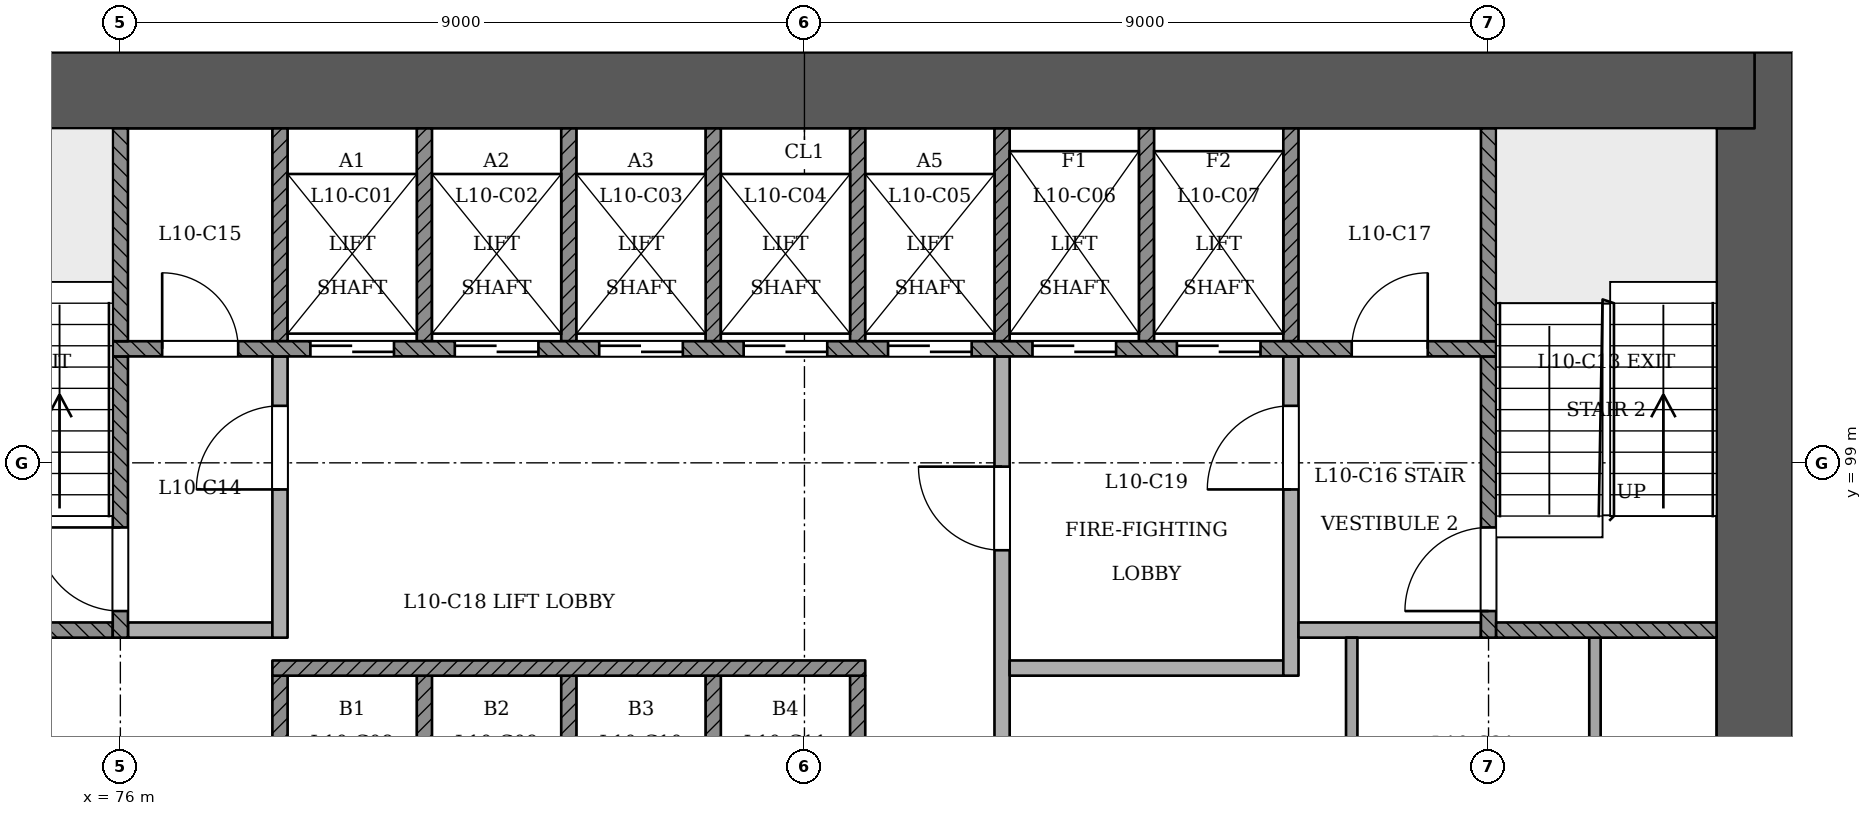
"""IFC4 building model, lengths in metres.
Left out: names, types, materials, properties, quantities, classifications, styles, units other than length and angle.
Written with IfcOpenShell. Run it as: python <this file> out.ifc"""

import sys

from ifc_helpers import new_model, si_unit, direction, frame, frame_2d, origin, place, context, subcontext, project, spatial, rectangle, extrude, element, fill, save


model = new_model("IFC4")
c1 = context("Model", 3, precision=1e-05, world=origin(), true_north=direction((0.0, 1.0)))
c2 = subcontext(c1, "Body", "Model", "MODEL_VIEW")
j1 = project(units=[si_unit("LENGTHUNIT", "METRE"), si_unit("PLANEANGLEUNIT", "RADIAN")], contexts=[c1])
p1 = place(None, origin())
s1 = spatial("IfcSite", under=j1, at=p1, CompositionType="ELEMENT")
p2 = place(p1, origin())
s2 = spatial("IfcBuilding", under=s1, at=p2, CompositionType="ELEMENT")
p3 = place(p2, frame((0.0, 0.0, 45.0)))
s3 = spatial("IfcBuildingStorey", under=s2, at=p3, CompositionType="ELEMENT", Elevation=45.0)
p4 = place(p3, frame((97.5, 92.9, 0.0), z_axis=(0.0, 0.0, 1.0), x_axis=(0.0, 1.0, 0.0)))
e1 = element("IfcWall", 1, at=p4, inside=s3, PredefinedType="SHEAR", context=c2, shape_type="SweptSolid", body=[
    extrude(rectangle(XDim=11.5, YDim=1.0, at=frame_2d((5.75, 0.0))), origin(), (0.0, 0.0, 1.0), 3.6),
])
p5 = place(p3, frame((97.5, 103.9, 0.0), z_axis=(0.0, 0.0, 1.0), x_axis=(-1.0, 0.0, 0.0)))
e2 = element("IfcWall", 2, at=p5, inside=s3, PredefinedType="SHEAR", context=c2, shape_type="SweptSolid", body=[
    extrude(rectangle(XDim=25.5, YDim=1.0, at=frame_2d((12.75, 0.0))), origin(), (0.0, 0.0, 1.0), 3.6),
])
p6 = place(p3, frame((61.853, 96.477, 0.0), z_axis=(0.0, 0.0, 1.0), x_axis=(0.500000327816, -0.86602521452, 0.0)))
e3 = element("IfcWall", 3, at=p6, inside=s3, PredefinedType="PARTITIONING", context=c2, shape_type="SweptSolid", body=[
    extrude(rectangle(XDim=39.979, YDim=0.15, at=frame_2d((19.99, 0.0))), origin(), (0.0, 0.0, 1.0), 2.7),
])
p7 = place(p6, frame((1.49, 0.0, 0.0)))
e4 = element("IfcOpeningElement", 4, at=p7, cuts=e3, PredefinedType="OPENING", context=c2, shape_type="SweptSolid", body=[
    extrude(rectangle(XDim=1.0, YDim=2.1, at=frame_2d((0.5, 1.05))), frame((0.0, 0.085, 0.0), z_axis=(0.0, -1.0, 0.0), x_axis=(1.0, 0.0, 0.0)), (0.0, 0.0, 1.0), 0.171),
])
p8 = place(p6, frame((4.55, 0.0, 0.0)))
e5 = element("IfcOpeningElement", 5, at=p8, cuts=e3, PredefinedType="OPENING", context=c2, shape_type="SweptSolid", body=[
    extrude(rectangle(XDim=1.1, YDim=2.1, at=frame_2d((0.55, 1.05))), frame((0.0, 0.085, 0.0), z_axis=(0.0, -1.0, 0.0), x_axis=(1.0, 0.0, 0.0)), (0.0, 0.0, 1.0), 0.171),
])
p9 = place(p6, frame((11.259, 0.0, 0.0)))
e6 = element("IfcOpeningElement", 6, at=p9, cuts=e3, PredefinedType="OPENING", context=c2, shape_type="SweptSolid", body=[
    extrude(rectangle(XDim=1.0, YDim=2.1, at=frame_2d((0.5, 1.05))), frame((0.0, 0.085, 0.0), z_axis=(0.0, -1.0, 0.0), x_axis=(1.0, 0.0, 0.0)), (0.0, 0.0, 1.0), 0.171),
])
p10 = place(p6, frame((17.979, 0.0, 0.0)))
e7 = element("IfcOpeningElement", 7, at=p10, cuts=e3, PredefinedType="OPENING", context=c2, shape_type="SweptSolid", body=[
    extrude(rectangle(XDim=1.2, YDim=2.1, at=frame_2d((0.6, 1.05))), frame((0.0, 0.085, 0.0), z_axis=(0.0, -1.0, 0.0), x_axis=(1.0, 0.0, 0.0)), (0.0, 0.0, 1.0), 0.171),
])
p11 = place(p6, frame((22.699, 0.0, 0.0)))
e8 = element("IfcOpeningElement", 8, at=p11, cuts=e3, PredefinedType="OPENING", context=c2, shape_type="SweptSolid", body=[
    extrude(rectangle(XDim=1.0, YDim=2.1, at=frame_2d((0.5, 1.05))), frame((0.0, 0.085, 0.0), z_axis=(0.0, -1.0, 0.0), x_axis=(1.0, 0.0, 0.0)), (0.0, 0.0, 1.0), 0.171),
])
p12 = place(p6, frame((29.374, 0.0, 0.0)))
e9 = element("IfcOpeningElement", 9, at=p12, cuts=e3, PredefinedType="OPENING", context=c2, shape_type="SweptSolid", body=[
    extrude(rectangle(XDim=1.0, YDim=2.1, at=frame_2d((0.5, 1.05))), frame((0.0, 0.085, 0.0), z_axis=(0.0, -1.0, 0.0), x_axis=(1.0, 0.0, 0.0)), (0.0, 0.0, 1.0), 0.171),
])
p13 = place(p6, frame((31.584, 0.0, 0.0)))
e10 = element("IfcOpeningElement", 10, at=p13, cuts=e3, PredefinedType="OPENING", context=c2, shape_type="SweptSolid", body=[
    extrude(rectangle(XDim=1.0, YDim=2.1, at=frame_2d((0.5, 1.05))), frame((0.0, 0.085, 0.0), z_axis=(0.0, -1.0, 0.0), x_axis=(1.0, 0.0, 0.0)), (0.0, 0.0, 1.0), 0.171),
])
p14 = place(p6, frame((38.374, 0.0, 0.0)))
e11 = element("IfcOpeningElement", 11, at=p14, cuts=e3, PredefinedType="OPENING", context=c2, shape_type="SweptSolid", body=[
    extrude(rectangle(XDim=1.0, YDim=2.1, at=frame_2d((0.5, 1.05))), frame((0.0, 0.085, 0.0), z_axis=(0.0, -1.0, 0.0), x_axis=(1.0, 0.0, 0.0)), (0.0, 0.0, 1.0), 0.171),
])
for number, where, z_axis, x_axis in (
    (12, (78.1, 93.4, 0.0), (0.0, 0.0, 1.0), (0.0, 1.0, 0.0)),
    (13, (80.0, 93.4, 0.0), (0.0, 0.0, 1.0), (0.0, 1.0, 0.0)),
    (14, (81.9, 93.4, 0.0), (0.0, 0.0, 1.0), (0.0, 1.0, 0.0)),
    (15, (83.8, 93.4, 0.0), (0.0, 0.0, 1.0), (0.0, 1.0, 0.0)),
    (16, (85.7, 93.4, 0.0), (0.0, 0.0, 1.0), (0.0, 1.0, 0.0)),
):
    element("IfcWall", number, at=place(p3, frame(where, z_axis=z_axis, x_axis=x_axis)), inside=s3, PredefinedType="SOLIDWALL", context=c2, shape_type="SweptSolid", body=[
        extrude(rectangle(XDim=2.8, YDim=0.2, at=frame_2d((1.4, 0.0))), origin(), (0.0, 0.0, 1.0), 3.1),
    ])
p15 = place(p3, frame((87.6, 93.4, 0.0), z_axis=(0.0, 0.0, 1.0), x_axis=(0.0, 1.0, 0.0)))
e17 = element("IfcWall", 17, at=p15, inside=s3, PredefinedType="PARTITIONING", context=c2, shape_type="SweptSolid", body=[
    extrude(rectangle(XDim=7.0, YDim=0.2, at=frame_2d((3.5, 0.0))), origin(), (0.0, 0.0, 1.0), 3.1),
])
p16 = place(p15, frame((4.45, 0.0, 0.0)))
e18 = element("IfcOpeningElement", 18, at=p16, cuts=e17, PredefinedType="OPENING", context=c2, shape_type="SweptSolid", body=[
    extrude(rectangle(XDim=1.1, YDim=2.1, at=frame_2d((0.55, 1.05))), frame((0.0, 0.11, 0.0), z_axis=(0.0, -1.0, 0.0), x_axis=(1.0, 0.0, 0.0)), (0.0, 0.0, 1.0), 0.221),
])
for number, where, z_axis, x_axis in (
    (19, (92.2, 93.4, 0.0), (0.0, 0.0, 1.0), (0.0, 1.0, 0.0)),
    (20, (95.4, 93.4, 0.0), (0.0, 0.0, 1.0), (0.0, 1.0, 0.0)),
):
    element("IfcWall", number, at=place(p3, frame(where, z_axis=z_axis, x_axis=x_axis)), inside=s3, PredefinedType="PARTITIONING", context=c2, shape_type="SweptSolid", body=[
        extrude(rectangle(XDim=3.3, YDim=0.15, at=frame_2d((1.65, 0.0))), origin(), (0.0, 0.0, 1.0), 3.1),
    ])
p17 = place(p3, frame((78.0, 96.3, 0.0), z_axis=(0.0, 0.0, 1.0), x_axis=(1.0, 0.0, 0.0)))
e21 = element("IfcWall", 21, at=p17, inside=s3, PredefinedType="SOLIDWALL", context=c2, shape_type="SweptSolid", body=[
    extrude(rectangle(XDim=7.8, YDim=0.2, at=frame_2d((3.9, 0.0))), origin(), (0.0, 0.0, 1.0), 3.1),
])
p18 = place(p3, frame((87.7, 96.3, 0.0), z_axis=(0.0, 0.0, 1.0), x_axis=(1.0, 0.0, 0.0)))
e22 = element("IfcWall", 22, at=p18, inside=s3, PredefinedType="PARTITIONING", context=c2, shape_type="SweptSolid", body=[
    extrude(rectangle(XDim=3.6, YDim=0.2, at=frame_2d((1.8, 0.0))), origin(), (0.0, 0.0, 1.0), 3.1),
])
p19 = place(p3, frame((91.4, 96.2, 0.0), z_axis=(0.0, 0.0, 1.0), x_axis=(0.0, 1.0, 0.0)))
e23 = element("IfcWall", 23, at=p19, inside=s3, PredefinedType="PARTITIONING", context=c2, shape_type="SweptSolid", body=[
    extrude(rectangle(XDim=4.2, YDim=0.2, at=frame_2d((2.1, 0.0))), origin(), (0.0, 0.0, 1.0), 3.1),
])
p20 = place(p19, frame((2.45, 0.0, 0.0)))
e24 = element("IfcOpeningElement", 24, at=p20, cuts=e23, PredefinedType="OPENING", context=c2, shape_type="SweptSolid", body=[
    extrude(rectangle(XDim=1.1, YDim=2.1, at=frame_2d((0.55, 1.05))), frame((0.0, 0.11, 0.0), z_axis=(0.0, -1.0, 0.0), x_axis=(1.0, 0.0, 0.0)), (0.0, 0.0, 1.0), 0.221),
])
p21 = place(p3, frame((73.0, 96.8, 0.0), z_axis=(0.0, 0.0, 1.0), x_axis=(1.0, 0.0, 0.0)))
e25 = element("IfcWall", 25, at=p21, inside=s3, PredefinedType="SOLIDWALL", context=c2, shape_type="SweptSolid", body=[
    extrude(rectangle(XDim=2.9, YDim=0.2, at=frame_2d((1.45, 0.0))), origin(), (0.0, 0.0, 1.0), 3.1),
])
p22 = place(p3, frame((76.0, 96.7, 0.0), z_axis=(0.0, 0.0, 1.0), x_axis=(0.0, 1.0, 0.0)))
e26 = element("IfcWall", 26, at=p22, inside=s3, PredefinedType="SOLIDWALL", context=c2, shape_type="SweptSolid", body=[
    extrude(rectangle(XDim=3.7, YDim=0.2, at=frame_2d((1.85, 0.0))), origin(), (0.0, 0.0, 1.0), 3.1),
])
p23 = place(p22, frame((0.35, 0.0, 0.0)))
e27 = element("IfcOpeningElement", 27, at=p23, cuts=e26, PredefinedType="OPENING", context=c2, shape_type="SweptSolid", body=[
    extrude(rectangle(XDim=1.1, YDim=2.1, at=frame_2d((0.55, 1.05))), frame((0.0, 0.11, 0.0), z_axis=(0.0, -1.0, 0.0), x_axis=(1.0, 0.0, 0.0)), (0.0, 0.0, 1.0), 0.221),
])
p24 = place(p3, frame((76.1, 96.8, 0.0), z_axis=(0.0, 0.0, 1.0), x_axis=(1.0, 0.0, 0.0)))
e28 = element("IfcWall", 28, at=p24, inside=s3, PredefinedType="PARTITIONING", context=c2, shape_type="SweptSolid", body=[
    extrude(rectangle(XDim=1.9, YDim=0.2, at=frame_2d((0.95, 0.0))), origin(), (0.0, 0.0, 1.0), 3.1),
])
p25 = place(p3, frame((78.1, 96.7, 0.0), z_axis=(0.0, 0.0, 1.0), x_axis=(0.0, 1.0, 0.0)))
e29 = element("IfcWall", 29, at=p25, inside=s3, PredefinedType="PARTITIONING", context=c2, shape_type="SweptSolid", body=[
    extrude(rectangle(XDim=3.7, YDim=0.2, at=frame_2d((1.85, 0.0))), origin(), (0.0, 0.0, 1.0), 3.1),
])
p26 = place(p25, frame((1.95, 0.0, 0.0)))
e30 = element("IfcOpeningElement", 30, at=p26, cuts=e29, PredefinedType="OPENING", context=c2, shape_type="SweptSolid", body=[
    extrude(rectangle(XDim=1.1, YDim=2.1, at=frame_2d((0.55, 1.05))), frame((0.0, 0.11, 0.0), z_axis=(0.0, -1.0, 0.0), x_axis=(1.0, 0.0, 0.0)), (0.0, 0.0, 1.0), 0.221),
])
p27 = place(p3, frame((91.5, 96.8, 0.0), z_axis=(0.0, 0.0, 1.0), x_axis=(1.0, 0.0, 0.0)))
e31 = element("IfcWall", 31, at=p27, inside=s3, PredefinedType="PARTITIONING", context=c2, shape_type="SweptSolid", body=[
    extrude(rectangle(XDim=2.4, YDim=0.2, at=frame_2d((1.2, 0.0))), origin(), (0.0, 0.0, 1.0), 3.1),
])
p28 = place(p3, frame((94.0, 96.7, 0.0), z_axis=(0.0, 0.0, 1.0), x_axis=(0.0, 1.0, 0.0)))
e32 = element("IfcWall", 32, at=p28, inside=s3, PredefinedType="SOLIDWALL", context=c2, shape_type="SweptSolid", body=[
    extrude(rectangle(XDim=3.7, YDim=0.2, at=frame_2d((1.85, 0.0))), origin(), (0.0, 0.0, 1.0), 3.1),
])
p29 = place(p28, frame((0.35, 0.0, 0.0)))
e33 = element("IfcOpeningElement", 33, at=p29, cuts=e32, PredefinedType="OPENING", context=c2, shape_type="SweptSolid", body=[
    extrude(rectangle(XDim=1.1, YDim=2.1, at=frame_2d((0.55, 1.05))), frame((0.0, 0.11, 0.0), z_axis=(0.0, -1.0, 0.0), x_axis=(1.0, 0.0, 0.0)), (0.0, 0.0, 1.0), 0.221),
])
p30 = place(p3, frame((94.1, 96.8, 0.0), z_axis=(0.0, 0.0, 1.0), x_axis=(1.0, 0.0, 0.0)))
e34 = element("IfcWall", 34, at=p30, inside=s3, PredefinedType="SOLIDWALL", context=c2, shape_type="SweptSolid", body=[
    extrude(rectangle(XDim=2.9, YDim=0.2, at=frame_2d((1.45, 0.0))), origin(), (0.0, 0.0, 1.0), 3.1),
])
p31 = place(p3, frame((75.9, 100.5, 0.0), z_axis=(0.0, 0.0, 1.0), x_axis=(1.0, 0.0, 0.0)))
e35 = element("IfcWall", 35, at=p31, inside=s3, PredefinedType="SOLIDWALL", context=c2, shape_type="SweptSolid", body=[
    extrude(rectangle(XDim=18.2, YDim=0.2, at=frame_2d((9.1, 0.0))), origin(), (0.0, 0.0, 1.0), 3.1),
])
p32 = place(p31, frame((2.6, 0.0, 0.0)))
e36 = element("IfcOpeningElement", 36, at=p32, cuts=e35, PredefinedType="OPENING", context=c2, shape_type="SweptSolid", body=[
    extrude(rectangle(XDim=1.1, YDim=2.1, at=frame_2d((0.55, 1.05))), frame((0.0, 0.11, 0.0), z_axis=(0.0, -1.0, 0.0), x_axis=(1.0, 0.0, 0.0)), (0.0, 0.0, 1.0), 0.221),
])
p33 = place(p31, frame((4.5, 0.0, 0.0)))
e37 = element("IfcOpeningElement", 37, at=p33, cuts=e35, PredefinedType="OPENING", context=c2, shape_type="SweptSolid", body=[
    extrude(rectangle(XDim=1.1, YDim=2.1, at=frame_2d((0.55, 1.05))), frame((0.0, 0.11, 0.0), z_axis=(0.0, -1.0, 0.0), x_axis=(1.0, 0.0, 0.0)), (0.0, 0.0, 1.0), 0.221),
])
p34 = place(p31, frame((6.4, 0.0, 0.0)))
e38 = element("IfcOpeningElement", 38, at=p34, cuts=e35, PredefinedType="OPENING", context=c2, shape_type="SweptSolid", body=[
    extrude(rectangle(XDim=1.1, YDim=2.1, at=frame_2d((0.55, 1.05))), frame((0.0, 0.11, 0.0), z_axis=(0.0, -1.0, 0.0), x_axis=(1.0, 0.0, 0.0)), (0.0, 0.0, 1.0), 0.221),
])
p35 = place(p31, frame((8.3, 0.0, 0.0)))
e39 = element("IfcOpeningElement", 39, at=p35, cuts=e35, PredefinedType="OPENING", context=c2, shape_type="SweptSolid", body=[
    extrude(rectangle(XDim=1.1, YDim=2.1, at=frame_2d((0.55, 1.05))), frame((0.0, 0.11, 0.0), z_axis=(0.0, -1.0, 0.0), x_axis=(1.0, 0.0, 0.0)), (0.0, 0.0, 1.0), 0.221),
])
p36 = place(p31, frame((10.2, 0.0, 0.0)))
e40 = element("IfcOpeningElement", 40, at=p36, cuts=e35, PredefinedType="OPENING", context=c2, shape_type="SweptSolid", body=[
    extrude(rectangle(XDim=1.1, YDim=2.1, at=frame_2d((0.55, 1.05))), frame((0.0, 0.11, 0.0), z_axis=(0.0, -1.0, 0.0), x_axis=(1.0, 0.0, 0.0)), (0.0, 0.0, 1.0), 0.221),
])
p37 = place(p31, frame((12.1, 0.0, 0.0)))
e41 = element("IfcOpeningElement", 41, at=p37, cuts=e35, PredefinedType="OPENING", context=c2, shape_type="SweptSolid", body=[
    extrude(rectangle(XDim=1.1, YDim=2.1, at=frame_2d((0.55, 1.05))), frame((0.0, 0.11, 0.0), z_axis=(0.0, -1.0, 0.0), x_axis=(1.0, 0.0, 0.0)), (0.0, 0.0, 1.0), 0.221),
])
p38 = place(p31, frame((14.0, 0.0, 0.0)))
e42 = element("IfcOpeningElement", 42, at=p38, cuts=e35, PredefinedType="OPENING", context=c2, shape_type="SweptSolid", body=[
    extrude(rectangle(XDim=1.1, YDim=2.1, at=frame_2d((0.55, 1.05))), frame((0.0, 0.11, 0.0), z_axis=(0.0, -1.0, 0.0), x_axis=(1.0, 0.0, 0.0)), (0.0, 0.0, 1.0), 0.221),
])
p39 = place(p31, frame((0.65, 0.0, 0.0)))
e43 = element("IfcOpeningElement", 43, at=p39, cuts=e35, PredefinedType="OPENING", context=c2, shape_type="SweptSolid", body=[
    extrude(rectangle(XDim=1.0, YDim=2.1, at=frame_2d((0.5, 1.05))), frame((0.0, 0.11, 0.0), z_axis=(0.0, -1.0, 0.0), x_axis=(1.0, 0.0, 0.0)), (0.0, 0.0, 1.0), 0.221),
])
p40 = place(p31, frame((16.3, 0.0, 0.0)))
e44 = element("IfcOpeningElement", 44, at=p40, cuts=e35, PredefinedType="OPENING", context=c2, shape_type="SweptSolid", body=[
    extrude(rectangle(XDim=1.0, YDim=2.1, at=frame_2d((0.5, 1.05))), frame((0.0, 0.11, 0.0), z_axis=(0.0, -1.0, 0.0), x_axis=(1.0, 0.0, 0.0)), (0.0, 0.0, 1.0), 0.221),
])
for number, where, z_axis, x_axis in (
    (45, (76.0, 100.6, 0.0), (0.0, 0.0, 1.0), (0.0, 1.0, 0.0)),
    (46, (78.1, 100.6, 0.0), (0.0, 0.0, 1.0), (0.0, 1.0, 0.0)),
    (47, (80.0, 100.6, 0.0), (0.0, 0.0, 1.0), (0.0, 1.0, 0.0)),
    (48, (81.9, 100.6, 0.0), (0.0, 0.0, 1.0), (0.0, 1.0, 0.0)),
    (49, (83.8, 100.6, 0.0), (0.0, 0.0, 1.0), (0.0, 1.0, 0.0)),
    (50, (85.7, 100.6, 0.0), (0.0, 0.0, 1.0), (0.0, 1.0, 0.0)),
    (51, (87.6, 100.6, 0.0), (0.0, 0.0, 1.0), (0.0, 1.0, 0.0)),
    (52, (89.5, 100.6, 0.0), (0.0, 0.0, 1.0), (0.0, 1.0, 0.0)),
    (53, (91.4, 100.6, 0.0), (0.0, 0.0, 1.0), (0.0, 1.0, 0.0)),
    (54, (94.0, 100.6, 0.0), (0.0, 0.0, 1.0), (0.0, 1.0, 0.0)),
):
    element("IfcWall", number, at=place(p3, frame(where, z_axis=z_axis, x_axis=x_axis)), inside=s3, PredefinedType="SOLIDWALL", context=c2, shape_type="SweptSolid", body=[
        extrude(rectangle(XDim=2.8, YDim=0.2, at=frame_2d((1.4, 0.0))), origin(), (0.0, 0.0, 1.0), 3.1),
    ])
p41 = place(p32, origin())
e55 = element("IfcDoor", 55, at=p41, inside=s3, OperationType="SLIDING_TO_RIGHT", PredefinedType="NOTDEFINED", context=c2, shape_type="SweptSolid", body=[
    extrude(rectangle(XDim=1.1, YDim=2.1, at=frame_2d((0.55, 1.05))), frame((0.0, 0.025, 0.0), z_axis=(0.0, -1.0, 0.0), x_axis=(1.0, 0.0, 0.0)), (0.0, 0.0, 1.0), 0.05),
])
fill(e36, e55)
p42 = place(p33, origin())
e56 = element("IfcDoor", 56, at=p42, inside=s3, OperationType="SLIDING_TO_LEFT", PredefinedType="NOTDEFINED", context=c2, shape_type="SweptSolid", body=[
    extrude(rectangle(XDim=1.1, YDim=2.1, at=frame_2d((0.55, 1.05))), frame((0.0, 0.025, 0.0), z_axis=(0.0, -1.0, 0.0), x_axis=(1.0, 0.0, 0.0)), (0.0, 0.0, 1.0), 0.05),
])
fill(e37, e56)
p43 = place(p34, origin())
e57 = element("IfcDoor", 57, at=p43, inside=s3, OperationType="SLIDING_TO_RIGHT", PredefinedType="NOTDEFINED", context=c2, shape_type="SweptSolid", body=[
    extrude(rectangle(XDim=1.1, YDim=2.1, at=frame_2d((0.55, 1.05))), frame((0.0, 0.025, 0.0), z_axis=(0.0, -1.0, 0.0), x_axis=(1.0, 0.0, 0.0)), (0.0, 0.0, 1.0), 0.05),
])
fill(e38, e57)
p44 = place(p35, origin())
e58 = element("IfcDoor", 58, at=p44, inside=s3, OperationType="SLIDING_TO_LEFT", PredefinedType="NOTDEFINED", context=c2, shape_type="SweptSolid", body=[
    extrude(rectangle(XDim=1.1, YDim=2.1, at=frame_2d((0.55, 1.05))), frame((0.0, 0.025, 0.0), z_axis=(0.0, -1.0, 0.0), x_axis=(1.0, 0.0, 0.0)), (0.0, 0.0, 1.0), 0.05),
])
fill(e39, e58)
p45 = place(p36, origin())
e59 = element("IfcDoor", 59, at=p45, inside=s3, OperationType="SLIDING_TO_RIGHT", PredefinedType="NOTDEFINED", context=c2, shape_type="SweptSolid", body=[
    extrude(rectangle(XDim=1.1, YDim=2.1, at=frame_2d((0.55, 1.05))), frame((0.0, 0.025, 0.0), z_axis=(0.0, -1.0, 0.0), x_axis=(1.0, 0.0, 0.0)), (0.0, 0.0, 1.0), 0.05),
])
fill(e40, e59)
p46 = place(p37, origin())
e60 = element("IfcDoor", 60, at=p46, inside=s3, OperationType="SLIDING_TO_RIGHT", PredefinedType="NOTDEFINED", context=c2, shape_type="SweptSolid", body=[
    extrude(rectangle(XDim=1.1, YDim=2.1, at=frame_2d((0.55, 1.05))), frame((0.0, 0.025, 0.0), z_axis=(0.0, -1.0, 0.0), x_axis=(1.0, 0.0, 0.0)), (0.0, 0.0, 1.0), 0.05),
])
fill(e41, e60)
p47 = place(p38, origin())
e61 = element("IfcDoor", 61, at=p47, inside=s3, OperationType="SLIDING_TO_LEFT", PredefinedType="NOTDEFINED", context=c2, shape_type="SweptSolid", body=[
    extrude(rectangle(XDim=1.1, YDim=2.1, at=frame_2d((0.55, 1.05))), frame((0.0, 0.025, 0.0), z_axis=(0.0, -1.0, 0.0), x_axis=(1.0, 0.0, 0.0)), (0.0, 0.0, 1.0), 0.05),
])
fill(e42, e61)
p48 = place(p23, origin())
e62 = element("IfcDoor", 62, at=p48, inside=s3, OperationType="SINGLE_SWING_RIGHT", PredefinedType="NOTDEFINED", context=c2, shape_type="SweptSolid", body=[
    extrude(rectangle(XDim=1.1, YDim=2.1, at=frame_2d((0.55, 1.05))), frame((0.0, 0.025, 0.0), z_axis=(0.0, -1.0, 0.0), x_axis=(1.0, 0.0, 0.0)), (0.0, 0.0, 1.0), 0.05),
])
fill(e27, e62)
p49 = place(p29, origin())
e63 = element("IfcDoor", 63, at=p49, inside=s3, OperationType="SINGLE_SWING_LEFT", PredefinedType="NOTDEFINED", context=c2, shape_type="SweptSolid", body=[
    extrude(rectangle(XDim=1.1, YDim=2.1, at=frame_2d((0.55, 1.05))), frame((0.0, 0.025, 0.0), z_axis=(0.0, -1.0, 0.0), x_axis=(1.0, 0.0, 0.0)), (0.0, 0.0, 1.0), 0.05),
])
fill(e33, e63)
p50 = place(p26, origin())
e64 = element("IfcDoor", 64, at=p50, inside=s3, OperationType="SINGLE_SWING_LEFT", PredefinedType="NOTDEFINED", context=c2, shape_type="SweptSolid", body=[
    extrude(rectangle(XDim=1.1, YDim=2.1, at=frame_2d((0.55, 1.05))), frame((0.0, 0.025, 0.0), z_axis=(0.0, -1.0, 0.0), x_axis=(1.0, 0.0, 0.0)), (0.0, 0.0, 1.0), 0.05),
])
fill(e30, e64)
p51 = place(p16, origin())
e65 = element("IfcDoor", 65, at=p51, inside=s3, OperationType="SINGLE_SWING_RIGHT", PredefinedType="NOTDEFINED", context=c2, shape_type="SweptSolid", body=[
    extrude(rectangle(XDim=1.1, YDim=2.1, at=frame_2d((0.55, 1.05))), frame((0.0, 0.025, 0.0), z_axis=(0.0, -1.0, 0.0), x_axis=(1.0, 0.0, 0.0)), (0.0, 0.0, 1.0), 0.05),
])
fill(e18, e65)
p52 = place(p20, origin())
e66 = element("IfcDoor", 66, at=p52, inside=s3, OperationType="SINGLE_SWING_LEFT", PredefinedType="NOTDEFINED", context=c2, shape_type="SweptSolid", body=[
    extrude(rectangle(XDim=1.1, YDim=2.1, at=frame_2d((0.55, 1.05))), frame((0.0, 0.025, 0.0), z_axis=(0.0, -1.0, 0.0), x_axis=(1.0, 0.0, 0.0)), (0.0, 0.0, 1.0), 0.05),
])
fill(e24, e66)
p53 = place(p39, origin())
e67 = element("IfcDoor", 67, at=p53, inside=s3, OperationType="SINGLE_SWING_LEFT", PredefinedType="NOTDEFINED", context=c2, shape_type="SweptSolid", body=[
    extrude(rectangle(XDim=1.0, YDim=2.1, at=frame_2d((0.5, 1.05))), frame((0.0, 0.025, 0.0), z_axis=(0.0, -1.0, 0.0), x_axis=(1.0, 0.0, 0.0)), (0.0, 0.0, 1.0), 0.05),
])
fill(e43, e67)
p54 = place(p40, origin())
e68 = element("IfcDoor", 68, at=p54, inside=s3, OperationType="SINGLE_SWING_RIGHT", PredefinedType="NOTDEFINED", context=c2, shape_type="SweptSolid", body=[
    extrude(rectangle(XDim=1.0, YDim=2.1, at=frame_2d((0.5, 1.05))), frame((0.0, 0.025, 0.0), z_axis=(0.0, -1.0, 0.0), x_axis=(1.0, 0.0, 0.0)), (0.0, 0.0, 1.0), 0.05),
])
fill(e44, e68)
save(model, sys.argv[1])
